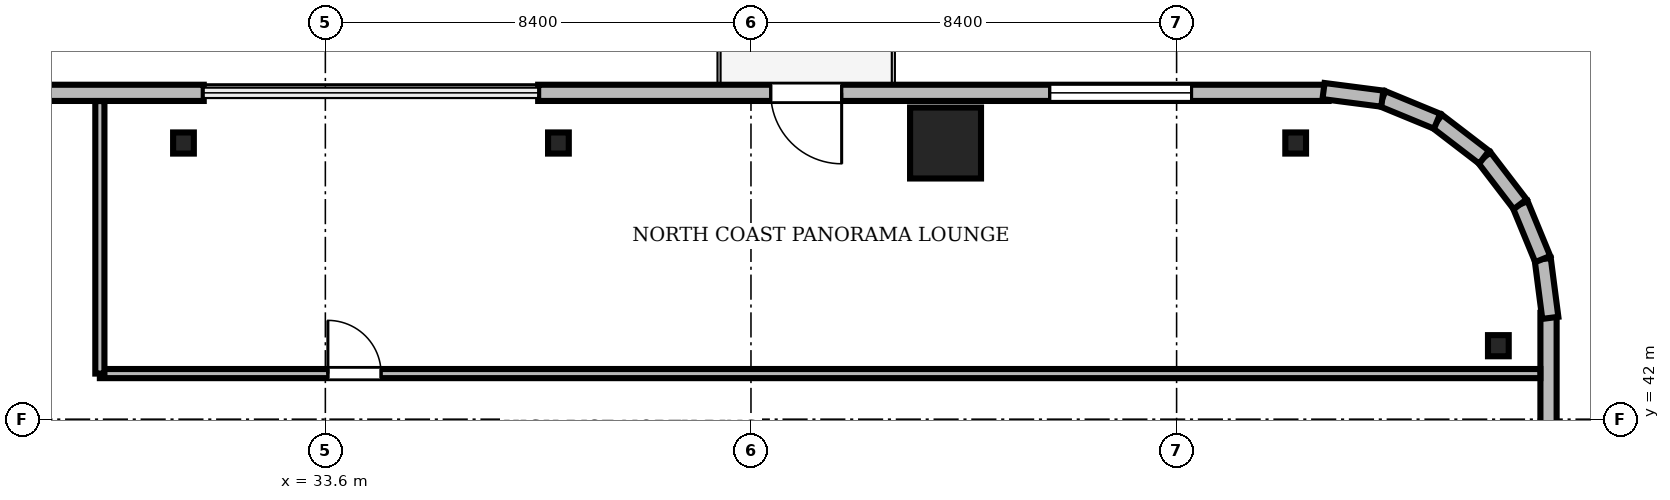
"""IFC4 building model, lengths in metres.
Left out: names, types, materials, properties, quantities, classifications, styles, units other than length and angle.
Written with IfcOpenShell. Run it as: python <this file> out.ifc"""

import sys

from ifc_helpers import new_model, si_unit, direction, frame, frame_2d, origin, origin_2d, place, context, subcontext, project, spatial, rectangle, i_section, extrude, source, transform, mapped, element, fill, save


model = new_model("IFC4")
c1 = context("Model", 3, precision=1e-05, world=origin(), true_north=direction((0.0, 1.0)))
c2 = subcontext(c1, "Body", "Model", "MODEL_VIEW")
j1 = project(units=[si_unit("LENGTHUNIT", "METRE"), si_unit("PLANEANGLEUNIT", "RADIAN")], contexts=[c1])
p1 = place(None, origin())
s1 = spatial("IfcSite", under=j1, at=p1, CompositionType="ELEMENT")
p2 = place(p1, origin())
s2 = spatial("IfcBuilding", under=s1, at=p2, CompositionType="ELEMENT")
p3 = place(p2, frame((0.0, 0.0, 188.55)))
s3 = spatial("IfcBuildingStorey", under=s2, at=p3, CompositionType="ELEMENT", Elevation=188.55)
m1 = source(origin(), c2, "Body", "SweptSolid", [
    extrude(rectangle(XDim=1.4, YDim=1.4, at=origin_2d()), origin(), (0.0, 0.0, 1.0), 3.53),
])
p4 = place(p3, frame((45.84, 47.45, 0.0), z_axis=(0.0, 0.0, 1.0), x_axis=(1.0, 0.0, 0.0)))
e1 = element("IfcColumn", 1, at=p4, inside=s3, PredefinedType="COLUMN", context=c2, shape_type="MappedRepresentation", body=[
    mapped(m1, transform((0.0, 0.0, 0.0), scale=1.0)),
])
m2 = source(origin(), c2, "Body", "SweptSolid", [
    extrude(i_section(OverallWidth=0.409, OverallDepth=0.417, WebThickness=0.021, FlangeThickness=0.033, FilletRadius=0.015, at=origin_2d()), origin(), (0.0, 0.0, 1.0), 3.53),
])
for number, where, z_axis, x_axis in (
    (2, (56.75, 43.45, 0.0), (0.0, 0.0, 1.0), (1.0, 0.0, 0.0)),
    (3, (52.75, 47.45, 0.0), (0.0, 0.0, 1.0), (1.0, 0.0, 0.0)),
    (4, (38.2, 47.45, 0.0), (0.0, 0.0, 1.0), (1.0, 0.0, 0.0)),
    (5, (30.8, 47.45, 0.0), (0.0, 0.0, 1.0), (1.0, 0.0, 0.0)),
):
    element("IfcColumn", number, at=place(p3, frame(where, z_axis=z_axis, x_axis=x_axis)), inside=s3, PredefinedType="COLUMN", context=c2, shape_type="MappedRepresentation", body=[
        mapped(m2, transform((0.0, 0.0, 0.0), scale=1.0)),
    ])
m3 = source(origin(), c2, "Body", "SweptSolid", [
    extrude(rectangle(XDim=15.6, YDim=0.32, at=frame_2d((7.8, 0.0))), origin(), (0.0, 0.0, 1.0), 3.53),
])
p5 = place(p3, frame((53.4, 48.44, 0.0), z_axis=(0.0, 0.0, 1.0), x_axis=(-1.0, 0.0, 0.0)))
e6 = element("IfcWall", 6, at=p5, inside=s3, PredefinedType="SOLIDWALL", context=c2, shape_type="MappedRepresentation", body=[
    mapped(m3, transform((0.0, 0.0, 0.0), scale=1.0)),
])
m4 = source(origin(), c2, "Body", "SweptSolid", [
    extrude(rectangle(XDim=1.4, YDim=2.3, at=frame_2d((0.7, 1.15))), frame((0.0, 0.17, 0.0), z_axis=(0.0, -1.0, 0.0), x_axis=(1.0, 0.0, 0.0)), (0.0, 0.0, 1.0), 0.34),
])
p6 = place(p5, frame((9.61, 0.0, 0.0)))
e7 = element("IfcOpeningElement", 7, at=p6, cuts=e6, PredefinedType="OPENING", context=c2, shape_type="MappedRepresentation", body=[
    mapped(m4, transform((0.0, 0.0, 0.0), scale=1.0)),
])
m5 = source(origin(), c2, "Body", "SweptSolid", [
    extrude(rectangle(XDim=2.8, YDim=2.4, at=frame_2d((1.4, 1.2))), frame((0.0, 0.17, 0.0), z_axis=(0.0, -1.0, 0.0), x_axis=(1.0, 0.0, 0.0)), (0.0, 0.0, 1.0), 0.34),
])
p7 = place(p5, frame((2.705, 0.0, 0.72)))
e8 = element("IfcOpeningElement", 8, at=p7, cuts=e6, PredefinedType="OPENING", context=c2, shape_type="MappedRepresentation", body=[
    mapped(m5, transform((0.0, 0.0, 0.0), scale=1.0)),
])
p8 = place(p3, frame((31.2, 48.44, 0.0), z_axis=(0.0, 0.0, 1.0), x_axis=(-1.0, 0.0, 0.0)))
e9 = element("IfcWall", 9, at=p8, inside=s3, PredefinedType="SOLIDWALL", context=c2, shape_type="MappedRepresentation", body=[
    mapped(m3, transform((0.0, 0.0, 0.0), scale=1.0)),
])
p9 = place(p8, frame((10.095, 0.0, 0.72)))
e10 = element("IfcOpeningElement", 10, at=p9, cuts=e9, PredefinedType="OPENING", context=c2, shape_type="MappedRepresentation", body=[
    mapped(m5, transform((0.0, 0.0, 0.0), scale=1.0)),
])
m6 = source(origin(), c2, "Body", "SweptSolid", [
    extrude(rectangle(XDim=15.6, YDim=0.32, at=frame_2d((7.8, 0.0))), origin(), (0.0, 0.0, 1.0), 3.53),
])
p10 = place(p3, frame((57.74, 28.5, 0.0), z_axis=(0.0, 0.0, 1.0), x_axis=(0.0, 1.0, 0.0)))
e11 = element("IfcWall", 11, at=p10, inside=s3, PredefinedType="SOLIDWALL", context=c2, shape_type="MappedRepresentation", body=[
    mapped(m6, transform((0.0, 0.0, 0.0), scale=1.0)),
])
p11 = place(p10, frame((10.095, 0.0, 0.72)))
e12 = element("IfcOpeningElement", 12, at=p11, cuts=e11, PredefinedType="OPENING", context=c2, shape_type="MappedRepresentation", body=[
    mapped(m5, transform((0.0, 0.0, 0.0), scale=1.0)),
])
m7 = source(origin(), c2, "Body", "SweptSolid", [
    extrude(rectangle(XDim=1.17, YDim=0.32, at=frame_2d((0.585, 0.0))), origin(), (0.0, 0.0, 1.0), 3.53),
])
p12 = place(p3, frame((57.776, 44.0, 0.0), z_axis=(0.0, 0.0, 1.0), x_axis=(-0.128295670475, 0.991735963317, 0.0)))
e13 = element("IfcWall", 13, at=p12, inside=s3, PredefinedType="SOLIDWALL", context=c2, shape_type="MappedRepresentation", body=[
    mapped(m7, transform((0.0, 0.0, 0.0), scale=1.0)),
])
m8 = source(origin(), c2, "Body", "SweptSolid", [
    extrude(rectangle(XDim=1.169, YDim=0.32, at=frame_2d((0.584, 0.0))), origin(), (0.0, 0.0, 1.0), 3.53),
])
p13 = place(p3, frame((57.625, 45.16, 0.0), z_axis=(0.0, 0.0, 1.0), x_axis=(-0.381054331552, 0.924552646638, 0.0)))
e14 = element("IfcWall", 14, at=p13, inside=s3, PredefinedType="SOLIDWALL", context=c2, shape_type="MappedRepresentation", body=[
    mapped(m8, transform((0.0, 0.0, 0.0), scale=1.0)),
])
m9 = source(origin(), c2, "Body", "SweptSolid", [
    extrude(rectangle(XDim=1.169, YDim=0.32, at=frame_2d((0.584, 0.0))), origin(), (0.0, 0.0, 1.0), 3.53),
])
p14 = place(p3, frame((57.18, 46.241, 0.0), z_axis=(0.0, 0.0, 1.0), x_axis=(-0.608387696831, 0.793639975269, 0.0)))
e15 = element("IfcWall", 15, at=p14, inside=s3, PredefinedType="SOLIDWALL", context=c2, shape_type="MappedRepresentation", body=[
    mapped(m9, transform((0.0, 0.0, 0.0), scale=1.0)),
])
m10 = source(origin(), c2, "Body", "SweptSolid", [
    extrude(rectangle(XDim=1.169, YDim=0.32, at=frame_2d((0.584, 0.0))), origin(), (0.0, 0.0, 1.0), 3.53),
])
p15 = place(p3, frame((56.469, 47.169, 0.0), z_axis=(0.0, 0.0, 1.0), x_axis=(-0.793663520347, 0.608356981114, 0.0)))
e16 = element("IfcWall", 16, at=p15, inside=s3, PredefinedType="SOLIDWALL", context=c2, shape_type="MappedRepresentation", body=[
    mapped(m10, transform((0.0, 0.0, 0.0), scale=1.0)),
])
p16 = place(p3, frame((55.541, 47.88, 0.0), z_axis=(0.0, 0.0, 1.0), x_axis=(-0.924552646638, 0.381054331552, 0.0)))
e17 = element("IfcWall", 17, at=p16, inside=s3, PredefinedType="SOLIDWALL", context=c2, shape_type="MappedRepresentation", body=[
    mapped(m8, transform((0.0, 0.0, 0.0), scale=1.0)),
])
p17 = place(p3, frame((54.46, 48.325, 0.0), z_axis=(0.0, 0.0, 1.0), x_axis=(-0.991735963317, 0.128295670475, 0.0)))
e18 = element("IfcWall", 18, at=p17, inside=s3, PredefinedType="SOLIDWALL", context=c2, shape_type="MappedRepresentation", body=[
    mapped(m7, transform((0.0, 0.0, 0.0), scale=1.0)),
])
m11 = source(origin(), c2, "Body", "SweptSolid", [
    extrude(rectangle(XDim=28.428, YDim=0.18, at=frame_2d((14.214, 0.0))), origin(), (0.0, 0.0, 1.0), 2.772),
])
p18 = place(p3, frame((29.15, 42.9, 0.0), z_axis=(0.0, 0.0, 1.0), x_axis=(1.0, 0.0, 0.0)))
e19 = element("IfcWall", 19, at=p18, inside=s3, PredefinedType="PARTITIONING", context=c2, shape_type="MappedRepresentation", body=[
    mapped(m11, transform((0.0, 0.0, 0.0), scale=1.0)),
])
m12 = source(origin(), c2, "Body", "SweptSolid", [
    extrude(rectangle(XDim=1.05, YDim=2.2, at=frame_2d((0.525, 1.1))), frame((0.0, 0.1, 0.0), z_axis=(0.0, -1.0, 0.0), x_axis=(1.0, 0.0, 0.0)), (0.0, 0.0, 1.0), 0.2),
])
p19 = place(p18, frame((4.5, 0.0, 0.0)))
e20 = element("IfcOpeningElement", 20, at=p19, cuts=e19, PredefinedType="OPENING", context=c2, shape_type="MappedRepresentation", body=[
    mapped(m12, transform((0.0, 0.0, 0.0), scale=1.0)),
])
m13 = source(origin(), c2, "Body", "SweptSolid", [
    extrude(rectangle(XDim=5.378, YDim=0.18, at=frame_2d((2.689, 0.0))), origin(), (0.0, 0.0, 1.0), 2.772),
])
p20 = place(p3, frame((29.15, 42.9, 0.0), z_axis=(0.0, 0.0, 1.0), x_axis=(0.0, 1.0, 0.0)))
e21 = element("IfcWall", 21, at=p20, inside=s3, PredefinedType="PARTITIONING", context=c2, shape_type="MappedRepresentation", body=[
    mapped(m13, transform((0.0, 0.0, 0.0), scale=1.0)),
])
m14 = source(origin(), c2, "Body", "SweptSolid", [
    extrude(rectangle(XDim=1.4, YDim=2.3, at=frame_2d((0.7, 1.15))), frame((0.0, 0.025, 0.0), z_axis=(0.0, -1.0, 0.0), x_axis=(1.0, 0.0, 0.0)), (0.0, 0.0, 1.0), 0.05),
])
p21 = place(p6, frame((1.4, 0.0, 0.0), z_axis=(0.0, 0.0, 1.0), x_axis=(-1.0, 0.0, 0.0)))
e22 = element("IfcDoor", 22, at=p21, inside=s3, OperationType="DOUBLE_DOOR_SLIDING", PredefinedType="DOOR", context=c2, shape_type="MappedRepresentation", body=[
    mapped(m14, transform((0.0, 0.0, 0.0), scale=1.0)),
])
fill(e7, e22)
m15 = source(origin(), c2, "Body", "SweptSolid", [
    extrude(rectangle(XDim=2.8, YDim=2.4, at=frame_2d((1.4, 1.2))), frame((0.0, 0.03, 0.0), z_axis=(0.0, -1.0, 0.0), x_axis=(1.0, 0.0, 0.0)), (0.0, 0.0, 1.0), 0.06),
])
p22 = place(p7, origin())
e23 = element("IfcWindow", 23, at=p22, inside=s3, PartitioningType="SINGLE_PANEL", PredefinedType="WINDOW", context=c2, shape_type="MappedRepresentation", body=[
    mapped(m15, transform((0.0, 0.0, 0.0), scale=1.0)),
])
fill(e8, e23)
m16 = source(origin(), c2, "Body", "SweptSolid", [
    extrude(rectangle(XDim=1.05, YDim=2.2, at=frame_2d((0.525, 1.1))), frame((0.0, 0.025, 0.0), z_axis=(0.0, -1.0, 0.0), x_axis=(1.0, 0.0, 0.0)), (0.0, 0.0, 1.0), 0.05),
])
p23 = place(p19, origin())
e24 = element("IfcDoor", 24, at=p23, inside=s3, OperationType="SINGLE_SWING_LEFT", PredefinedType="DOOR", context=c2, shape_type="MappedRepresentation", body=[
    mapped(m16, transform((0.0, 0.0, 0.0), scale=1.0)),
])
fill(e20, e24)
save(model, sys.argv[1])
